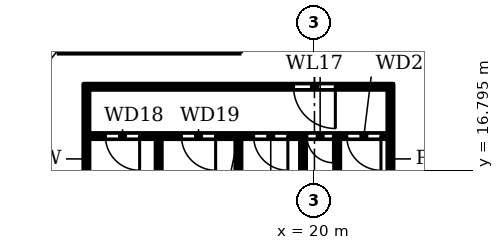
"""IFC4 building model, lengths in metres.
Left out: names, types, materials, properties, quantities, classifications, styles, units other than length and angle.
Written with IfcOpenShell. Run it as: python <this file> out.ifc"""

import sys

from ifc_helpers import new_model, si_unit, direction, frame, frame_2d, origin, place, context, subcontext, project, spatial, rectangle, extrude, element, fill, save


model = new_model("IFC4")
c1 = context("Model", 3, precision=1e-05, world=origin(), true_north=direction((0.0, 1.0)))
c2 = subcontext(c1, "Body", "Model", "MODEL_VIEW")
j1 = project(units=[si_unit("LENGTHUNIT", "METRE"), si_unit("PLANEANGLEUNIT", "RADIAN")], contexts=[c1])
p1 = place(None, origin())
s1 = spatial("IfcSite", under=j1, at=p1, CompositionType="ELEMENT")
p2 = place(p1, origin())
s2 = spatial("IfcBuilding", under=s1, at=p2, CompositionType="ELEMENT")
p3 = place(p2, frame((0.0, 0.0, 143.4)))
s3 = spatial("IfcBuildingStorey", under=s2, at=p3, CompositionType="ELEMENT", Elevation=143.4)
p4 = place(p3, frame((14.0, 17.7, 0.0), z_axis=(0.0, 0.0, 1.0), x_axis=(1.0, 0.0, 0.0)))
e1 = element("IfcWall", 1, at=p4, inside=s3, PredefinedType="PARTITIONING", context=c2, shape_type="SweptSolid", body=[
    extrude(rectangle(XDim=8.0, YDim=0.1, at=frame_2d((4.0, 0.0))), origin(), (0.0, 0.0, 1.0), 3.58),
])
p5 = place(p4, frame((0.5, 0.0, 0.0)))
e2 = element("IfcOpeningElement", 2, at=p5, cuts=e1, PredefinedType="OPENING", context=c2, shape_type="SweptSolid", body=[
    extrude(rectangle(XDim=0.9, YDim=2.1, at=frame_2d((0.45, 1.05))), frame((0.0, 0.06, 0.0), z_axis=(0.0, -1.0, 0.0), x_axis=(1.0, 0.0, 0.0)), (0.0, 0.0, 1.0), 0.12),
])
p6 = place(p4, frame((2.5, 0.0, 0.0)))
e3 = element("IfcOpeningElement", 3, at=p6, cuts=e1, PredefinedType="OPENING", context=c2, shape_type="SweptSolid", body=[
    extrude(rectangle(XDim=0.9, YDim=2.1, at=frame_2d((0.45, 1.05))), frame((0.0, 0.06, 0.0), z_axis=(0.0, -1.0, 0.0), x_axis=(1.0, 0.0, 0.0)), (0.0, 0.0, 1.0), 0.12),
])
p7 = place(p4, frame((4.4, 0.0, 0.0)))
e4 = element("IfcOpeningElement", 4, at=p7, cuts=e1, PredefinedType="OPENING", context=c2, shape_type="SweptSolid", body=[
    extrude(rectangle(XDim=0.9, YDim=2.1, at=frame_2d((0.45, 1.05))), frame((0.0, 0.06, 0.0), z_axis=(0.0, -1.0, 0.0), x_axis=(1.0, 0.0, 0.0)), (0.0, 0.0, 1.0), 0.12),
])
p8 = place(p4, frame((5.8, 0.0, 0.0)))
e5 = element("IfcOpeningElement", 5, at=p8, cuts=e1, PredefinedType="OPENING", context=c2, shape_type="SweptSolid", body=[
    extrude(rectangle(XDim=0.7, YDim=2.1, at=frame_2d((0.35, 1.05))), frame((0.0, 0.06, 0.0), z_axis=(0.0, -1.0, 0.0), x_axis=(1.0, 0.0, 0.0)), (0.0, 0.0, 1.0), 0.12),
])
p9 = place(p4, frame((6.85, 0.0, 0.0)))
e6 = element("IfcOpeningElement", 6, at=p9, cuts=e1, PredefinedType="OPENING", context=c2, shape_type="SweptSolid", body=[
    extrude(rectangle(XDim=0.9, YDim=2.1, at=frame_2d((0.45, 1.05))), frame((0.0, 0.06, 0.0), z_axis=(0.0, -1.0, 0.0), x_axis=(1.0, 0.0, 0.0)), (0.0, 0.0, 1.0), 0.12),
])
p10 = place(p3, frame((14.0, 19.0, 0.0), z_axis=(0.0, 0.0, 1.0), x_axis=(1.0, 0.0, 0.0)))
e7 = element("IfcWall", 7, at=p10, inside=s3, PredefinedType="PARTITIONING", context=c2, shape_type="SweptSolid", body=[
    extrude(rectangle(XDim=8.0, YDim=0.1, at=frame_2d((4.0, 0.0))), origin(), (0.0, 0.0, 1.0), 3.58),
])
p11 = place(p10, frame((5.45, 0.0, 0.0)))
e8 = element("IfcOpeningElement", 8, at=p11, cuts=e7, PredefinedType="OPENING", context=c2, shape_type="SweptSolid", body=[
    extrude(rectangle(XDim=1.1, YDim=2.1, at=frame_2d((0.55, 1.05))), frame((0.0, 0.06, 0.0), z_axis=(0.0, -1.0, 0.0), x_axis=(1.0, 0.0, 0.0)), (0.0, 0.0, 1.0), 0.12),
])
p12 = place(p3, frame((14.0, 15.2, 0.0), z_axis=(0.0, 0.0, 1.0), x_axis=(0.0, 1.0, 0.0)))
e9 = element("IfcWall", 9, at=p12, inside=s3, PredefinedType="PARTITIONING", context=c2, shape_type="SweptSolid", body=[
    extrude(rectangle(XDim=3.8, YDim=0.1, at=frame_2d((1.9, 0.0))), origin(), (0.0, 0.0, 1.0), 3.58),
])
for number, where, z_axis, x_axis in (
    (10, (15.9, 15.2, 0.0), (0.0, 0.0, 1.0), (0.0, 1.0, 0.0)),
    (11, (18.0, 15.2, 0.0), (0.0, 0.0, 1.0), (0.0, 1.0, 0.0)),
    (12, (19.7, 15.2, 0.0), (0.0, 0.0, 1.0), (0.0, 1.0, 0.0)),
    (13, (20.6, 15.2, 0.0), (0.0, 0.0, 1.0), (0.0, 1.0, 0.0)),
):
    element("IfcWall", number, at=place(p3, frame(where, z_axis=z_axis, x_axis=x_axis)), inside=s3, PredefinedType="PARTITIONING", context=c2, shape_type="SweptSolid", body=[
        extrude(rectangle(XDim=2.5, YDim=0.1, at=frame_2d((1.25, 0.0))), origin(), (0.0, 0.0, 1.0), 3.58),
    ])
p13 = place(p3, frame((22.0, 15.2, 0.0), z_axis=(0.0, 0.0, 1.0), x_axis=(0.0, 1.0, 0.0)))
e14 = element("IfcWall", 14, at=p13, inside=s3, PredefinedType="PARTITIONING", context=c2, shape_type="SweptSolid", body=[
    extrude(rectangle(XDim=3.8, YDim=0.1, at=frame_2d((1.9, 0.0))), origin(), (0.0, 0.0, 1.0), 3.58),
])
p14 = place(p11, frame((1.1, 0.0, 0.0), z_axis=(0.0, 0.0, 1.0), x_axis=(-1.0, 0.0, 0.0)))
e15 = element("IfcDoor", 15, at=p14, inside=s3, OperationType="SINGLE_SWING_LEFT", PredefinedType="DOOR", context=c2, shape_type="SweptSolid", body=[
    extrude(rectangle(XDim=1.1, YDim=2.1, at=frame_2d((0.55, 1.05))), frame((0.0, 0.025, 0.0), z_axis=(0.0, -1.0, 0.0), x_axis=(1.0, 0.0, 0.0)), (0.0, 0.0, 1.0), 0.05),
])
fill(e8, e15)
p15 = place(p5, frame((0.9, 0.0, 0.0), z_axis=(0.0, 0.0, 1.0), x_axis=(-1.0, 0.0, 0.0)))
e16 = element("IfcDoor", 16, at=p15, inside=s3, OperationType="SINGLE_SWING_LEFT", PredefinedType="DOOR", context=c2, shape_type="SweptSolid", body=[
    extrude(rectangle(XDim=0.9, YDim=2.1, at=frame_2d((0.45, 1.05))), frame((0.0, 0.025, 0.0), z_axis=(0.0, -1.0, 0.0), x_axis=(1.0, 0.0, 0.0)), (0.0, 0.0, 1.0), 0.05),
])
fill(e2, e16)
p16 = place(p6, frame((0.9, 0.0, 0.0), z_axis=(0.0, 0.0, 1.0), x_axis=(-1.0, 0.0, 0.0)))
e17 = element("IfcDoor", 17, at=p16, inside=s3, OperationType="SINGLE_SWING_LEFT", PredefinedType="DOOR", context=c2, shape_type="SweptSolid", body=[
    extrude(rectangle(XDim=0.9, YDim=2.1, at=frame_2d((0.45, 1.05))), frame((0.0, 0.025, 0.0), z_axis=(0.0, -1.0, 0.0), x_axis=(1.0, 0.0, 0.0)), (0.0, 0.0, 1.0), 0.05),
])
fill(e3, e17)
p17 = place(p7, frame((0.9, 0.0, 0.0), z_axis=(0.0, 0.0, 1.0), x_axis=(-1.0, 0.0, 0.0)))
e18 = element("IfcDoor", 18, at=p17, inside=s3, OperationType="SINGLE_SWING_LEFT", PredefinedType="DOOR", context=c2, shape_type="SweptSolid", body=[
    extrude(rectangle(XDim=0.9, YDim=2.1, at=frame_2d((0.45, 1.05))), frame((0.0, 0.025, 0.0), z_axis=(0.0, -1.0, 0.0), x_axis=(1.0, 0.0, 0.0)), (0.0, 0.0, 1.0), 0.05),
])
fill(e4, e18)
p18 = place(p8, frame((0.7, 0.0, 0.0), z_axis=(0.0, 0.0, 1.0), x_axis=(-1.0, 0.0, 0.0)))
e19 = element("IfcDoor", 19, at=p18, inside=s3, OperationType="SINGLE_SWING_LEFT", PredefinedType="DOOR", context=c2, shape_type="SweptSolid", body=[
    extrude(rectangle(XDim=0.7, YDim=2.1, at=frame_2d((0.35, 1.05))), frame((0.0, 0.025, 0.0), z_axis=(0.0, -1.0, 0.0), x_axis=(1.0, 0.0, 0.0)), (0.0, 0.0, 1.0), 0.05),
])
fill(e5, e19)
p19 = place(p9, frame((0.9, 0.0, 0.0), z_axis=(0.0, 0.0, 1.0), x_axis=(-1.0, 0.0, 0.0)))
e20 = element("IfcDoor", 20, at=p19, inside=s3, OperationType="SINGLE_SWING_LEFT", PredefinedType="DOOR", context=c2, shape_type="SweptSolid", body=[
    extrude(rectangle(XDim=0.9, YDim=2.1, at=frame_2d((0.45, 1.05))), frame((0.0, 0.025, 0.0), z_axis=(0.0, -1.0, 0.0), x_axis=(1.0, 0.0, 0.0)), (0.0, 0.0, 1.0), 0.05),
])
fill(e6, e20)
save(model, sys.argv[1])
